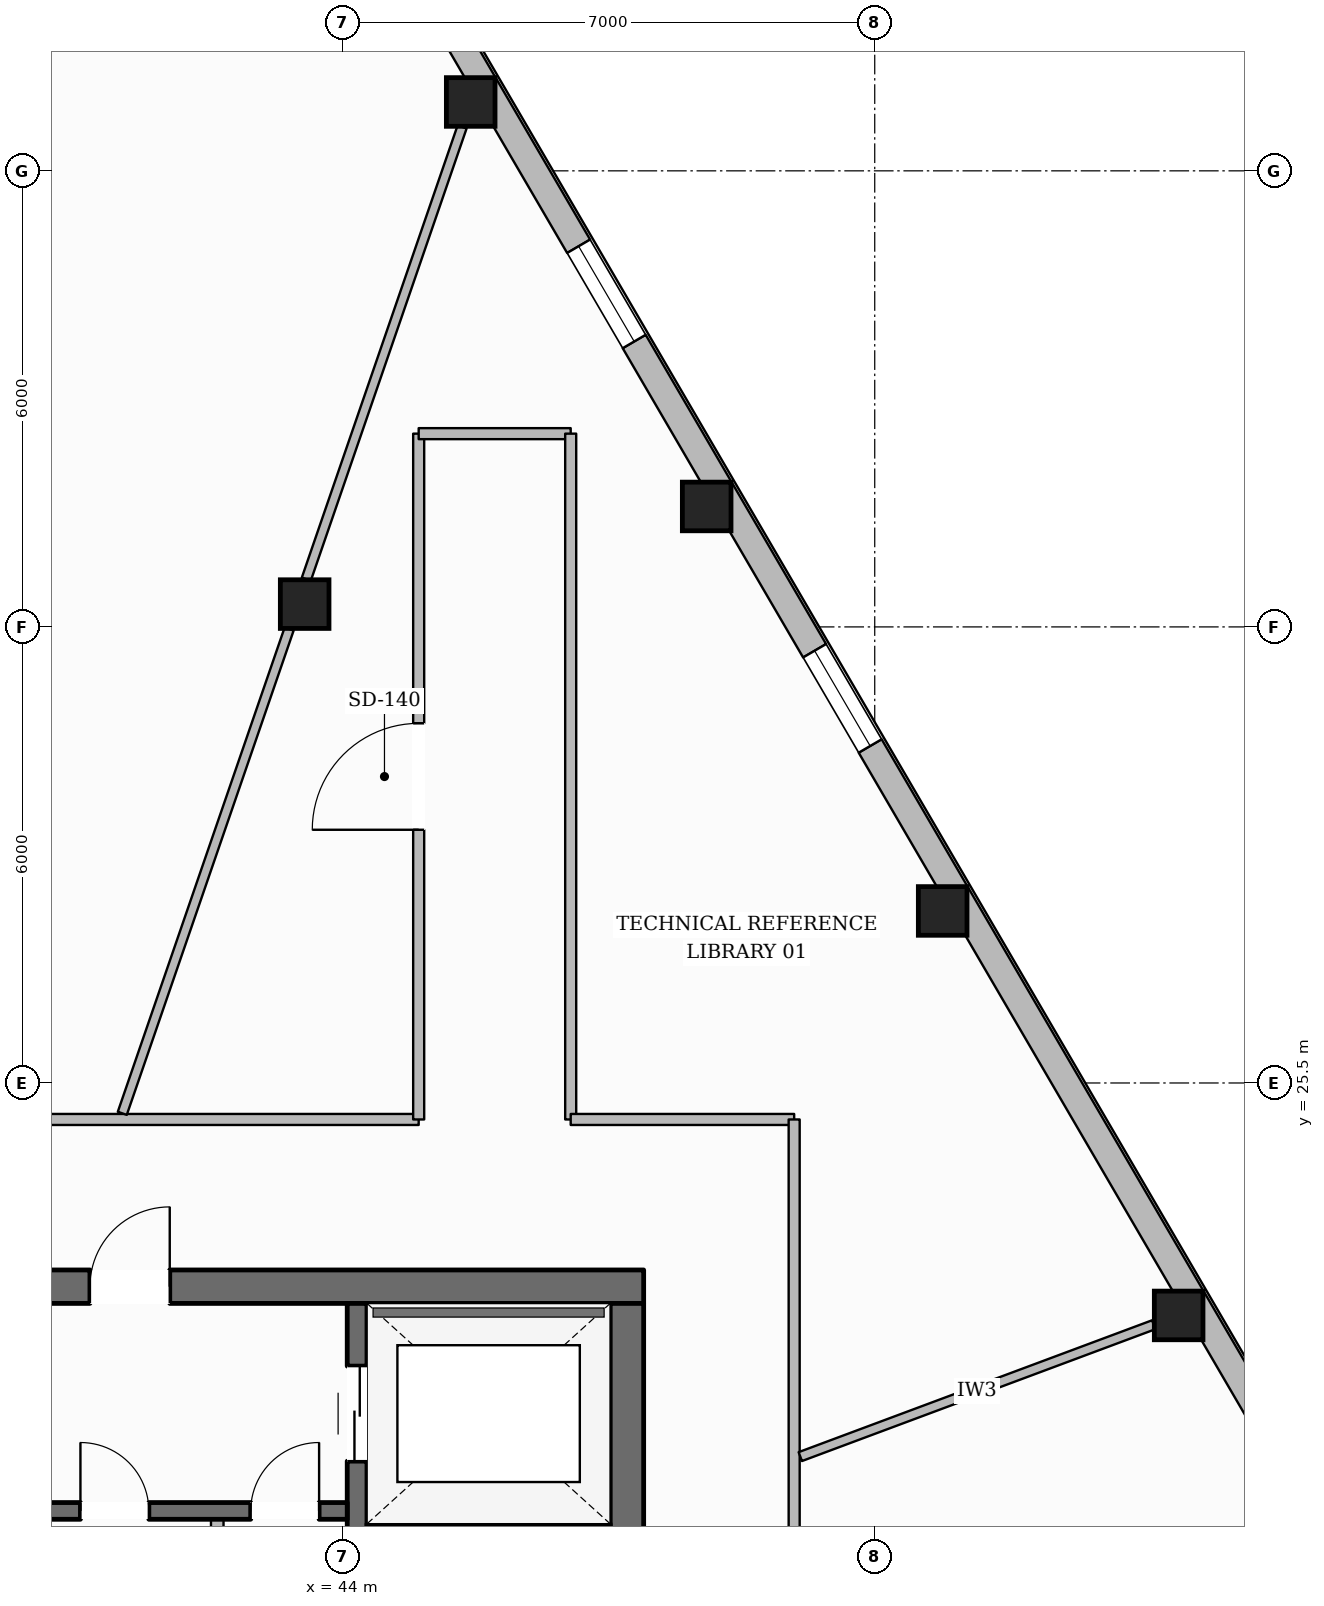
"""IFC4 building model, lengths in metres.
Left out: names, types, materials, properties, quantities, classifications, styles, units other than length and angle.
Written with IfcOpenShell. Run it as: python <this file> out.ifc"""

import sys

from ifc_helpers import new_model, si_unit, direction, frame, frame_2d, origin, origin_2d, place, context, subcontext, project, spatial, rectangle, hollow_rectangle, extrude, element, fill, save


model = new_model("IFC4")
c1 = context("Model", 3, precision=1e-05, world=origin(), true_north=direction((0.0, 1.0)))
c2 = subcontext(c1, "Body", "Model", "MODEL_VIEW")
j1 = project(units=[si_unit("LENGTHUNIT", "METRE"), si_unit("PLANEANGLEUNIT", "RADIAN")], contexts=[c1])
p1 = place(None, origin())
s1 = spatial("IfcSite", under=j1, at=p1, CompositionType="ELEMENT")
p2 = place(p1, origin())
s2 = spatial("IfcBuilding", under=s1, at=p2, CompositionType="ELEMENT")
p3 = place(p2, frame((0.0, 0.0, 180.4)))
s3 = spatial("IfcBuildingStorey", under=s2, at=p3, CompositionType="ELEMENT", Elevation=180.4)
p4 = place(p3, frame((28.04, 22.82, 0.0), z_axis=(0.0, 0.0, 1.0), x_axis=(1.0, 0.0, 0.0)))
e1 = element("IfcWall", 1, at=p4, inside=s3, PredefinedType="SOLIDWALL", context=c2, shape_type="SweptSolid", body=[
    extrude(rectangle(XDim=19.92, YDim=0.44, at=frame_2d((9.96, 0.0))), origin(), (0.0, 0.0, 1.0), 3.6),
])
p5 = place(p4, frame((6.235, 0.0, 0.0)))
e2 = element("IfcOpeningElement", 2, at=p5, cuts=e1, PredefinedType="OPENING", context=c2, shape_type="SweptSolid", body=[
    extrude(rectangle(XDim=1.05, YDim=2.15, at=frame_2d((0.525, 1.075))), frame((0.0, 0.23, 0.0), z_axis=(0.0, -1.0, 0.0), x_axis=(1.0, 0.0, 0.0)), (0.0, 0.0, 1.0), 0.46),
])
p6 = place(p4, frame((12.635, 0.0, 0.0)))
e3 = element("IfcOpeningElement", 3, at=p6, cuts=e1, PredefinedType="OPENING", context=c2, shape_type="SweptSolid", body=[
    extrude(rectangle(XDim=1.05, YDim=2.15, at=frame_2d((0.525, 1.075))), frame((0.0, 0.23, 0.0), z_axis=(0.0, -1.0, 0.0), x_axis=(1.0, 0.0, 0.0)), (0.0, 0.0, 1.0), 0.46),
])
p7 = place(p3, frame((47.74, 9.6, 0.0), z_axis=(0.0, 0.0, 1.0), x_axis=(0.0, 1.0, 0.0)))
e4 = element("IfcWall", 4, at=p7, inside=s3, PredefinedType="SOLIDWALL", context=c2, shape_type="SweptSolid", body=[
    extrude(rectangle(XDim=13.0, YDim=0.44, at=frame_2d((6.5, 0.0))), origin(), (0.0, 0.0, 1.0), 3.6),
])
p8 = place(p7, frame((0.2, 0.0, 0.0)))
e5 = element("IfcOpeningElement", 5, at=p8, cuts=e4, PredefinedType="OPENING", context=c2, shape_type="SweptSolid", body=[
    extrude(rectangle(XDim=1.1, YDim=2.15, at=frame_2d((0.55, 1.075))), frame((0.0, 0.23, 0.0), z_axis=(0.0, -1.0, 0.0), x_axis=(1.0, 0.0, 0.0)), (0.0, 0.0, 1.0), 0.46),
])
p9 = place(p7, frame((8.4, 0.0, 0.0)))
e6 = element("IfcOpeningElement", 6, at=p9, cuts=e4, PredefinedType="OPENING", context=c2, shape_type="SweptSolid", body=[
    extrude(rectangle(XDim=0.9, YDim=2.1, at=frame_2d((0.45, 1.05))), frame((0.0, 0.23, 0.0), z_axis=(0.0, -1.0, 0.0), x_axis=(1.0, 0.0, 0.0)), (0.0, 0.0, 1.0), 0.46),
])
p10 = place(p3, frame((44.19, 9.6, 0.0), z_axis=(0.0, 0.0, 1.0), x_axis=(0.0, 1.0, 0.0)))
e7 = element("IfcWall", 7, at=p10, inside=s3, PredefinedType="SHEAR", context=c2, shape_type="SweptSolid", body=[
    extrude(rectangle(XDim=13.0, YDim=0.26, at=frame_2d((6.5, 0.0))), origin(), (0.0, 0.0, 1.0), 3.6),
])
p11 = place(p10, frame((10.925, 0.0, 0.0)))
e8 = element("IfcOpeningElement", 8, at=p11, cuts=e7, PredefinedType="OPENING", context=c2, shape_type="SweptSolid", body=[
    extrude(rectangle(XDim=1.25, YDim=2.25, at=frame_2d((0.625, 1.125))), frame((0.0, 0.14, 0.0), z_axis=(0.0, -1.0, 0.0), x_axis=(1.0, 0.0, 0.0)), (0.0, 0.0, 1.0), 0.28),
])
p12 = place(p3, frame((44.32, 19.57, 0.0), z_axis=(0.0, 0.0, 1.0), x_axis=(1.0, 0.0, 0.0)))
e9 = element("IfcWall", 9, at=p12, inside=s3, PredefinedType="SHEAR", context=c2, shape_type="SweptSolid", body=[
    extrude(rectangle(XDim=3.2, YDim=0.26, at=frame_2d((1.6, 0.0))), origin(), (0.0, 0.0, 1.0), 3.6),
])
p13 = place(p3, frame((31.94, 19.87, 0.0), z_axis=(0.0, 0.0, 1.0), x_axis=(1.0, 0.0, 0.0)))
e10 = element("IfcWall", 10, at=p13, inside=s3, PredefinedType="SOLIDWALL", context=c2, shape_type="SweptSolid", body=[
    extrude(rectangle(XDim=12.12, YDim=0.22, at=frame_2d((6.06, 0.0))), origin(), (0.0, 0.0, 1.0), 3.6),
])
p14 = place(p13, frame((6.3, 0.0, 0.0)))
e11 = element("IfcOpeningElement", 11, at=p14, cuts=e10, PredefinedType="OPENING", context=c2, shape_type="SweptSolid", body=[
    extrude(rectangle(XDim=1.1, YDim=2.15, at=frame_2d((0.55, 1.075))), frame((0.0, 0.12, 0.0), z_axis=(0.0, -1.0, 0.0), x_axis=(1.0, 0.0, 0.0)), (0.0, 0.0, 1.0), 0.24),
])
p15 = place(p13, frame((8.61, 0.0, 0.0)))
e12 = element("IfcOpeningElement", 12, at=p15, cuts=e10, PredefinedType="OPENING", context=c2, shape_type="SweptSolid", body=[
    extrude(rectangle(XDim=0.9, YDim=2.1, at=frame_2d((0.45, 1.05))), frame((0.0, 0.12, 0.0), z_axis=(0.0, -1.0, 0.0), x_axis=(1.0, 0.0, 0.0)), (0.0, 0.0, 1.0), 0.24),
])
p16 = place(p13, frame((10.85, 0.0, 0.0)))
e13 = element("IfcOpeningElement", 13, at=p16, cuts=e10, PredefinedType="OPENING", context=c2, shape_type="SweptSolid", body=[
    extrude(rectangle(XDim=0.9, YDim=2.1, at=frame_2d((0.45, 1.05))), frame((0.0, 0.12, 0.0), z_axis=(0.0, -1.0, 0.0), x_axis=(1.0, 0.0, 0.0)), (0.0, 0.0, 1.0), 0.24),
])
for number, where, z_axis, x_axis in (
    (14, (54.998, 22.442, 0.0), (0.0, 0.0, 1.0), (1.0, 0.0, 0.0)),
    (15, (51.894, 27.763, 0.0), (0.0, 0.0, 1.0), (1.0, 0.0, 0.0)),
    (16, (48.789, 33.085, 0.0), (0.0, 0.0, 1.0), (1.0, 0.0, 0.0)),
    (17, (45.684, 38.406, 0.0), (0.0, 0.0, 1.0), (1.0, 0.0, 0.0)),
    (18, (43.5, 31.8, 0.0), (0.0, 0.0, 1.0), (1.0, 0.0, 0.0)),
):
    element("IfcColumn", number, at=place(p3, frame(where, z_axis=z_axis, x_axis=x_axis)), inside=s3, PredefinedType="COLUMN", context=c2, shape_type="SweptSolid", body=[
        extrude(hollow_rectangle(XDim=0.64, YDim=0.64, WallThickness=0.028, at=origin_2d()), origin(), (0.0, 0.0, 1.0), 3.6),
    ])
p17 = place(p3, frame((42.575, 44.272, 0.0), z_axis=(0.0, 0.0, 1.0), x_axis=(0.503934681705, -0.863741764982, 0.0)))
e19 = element("IfcWall", 19, at=p17, inside=s3, PredefinedType="STANDARD", context=c2, shape_type="SweptSolid", body=[
    extrude(rectangle(XDim=37.915, YDim=0.35, at=frame_2d((18.958, 0.0))), origin(), (0.0, 0.0, 1.0), 3.132),
])
p18 = place(p17, frame((33.633, 0.0, 0.65)))
e20 = element("IfcOpeningElement", 20, at=p18, cuts=e19, PredefinedType="OPENING", context=c2, shape_type="SweptSolid", body=[
    extrude(rectangle(XDim=1.45, YDim=1.75, at=frame_2d((0.725, 0.875))), frame((0.0, 0.185, 0.0), z_axis=(0.0, -1.0, 0.0), x_axis=(1.0, 0.0, 0.0)), (0.0, 0.0, 1.0), 0.37),
])
p19 = place(p17, frame((27.472, 0.0, 0.65)))
e21 = element("IfcOpeningElement", 21, at=p19, cuts=e19, PredefinedType="OPENING", context=c2, shape_type="SweptSolid", body=[
    extrude(rectangle(XDim=1.45, YDim=1.75, at=frame_2d((0.725, 0.875))), frame((0.0, 0.185, 0.0), z_axis=(0.0, -1.0, 0.0), x_axis=(1.0, 0.0, 0.0)), (0.0, 0.0, 1.0), 0.37),
])
p20 = place(p17, frame((15.15, 0.0, 0.65)))
e22 = element("IfcOpeningElement", 22, at=p20, cuts=e19, PredefinedType="OPENING", context=c2, shape_type="SweptSolid", body=[
    extrude(rectangle(XDim=1.45, YDim=1.75, at=frame_2d((0.725, 0.875))), frame((0.0, 0.185, 0.0), z_axis=(0.0, -1.0, 0.0), x_axis=(1.0, 0.0, 0.0)), (0.0, 0.0, 1.0), 0.37),
])
p21 = place(p17, frame((8.989, 0.0, 0.65)))
e23 = element("IfcOpeningElement", 23, at=p21, cuts=e19, PredefinedType="OPENING", context=c2, shape_type="SweptSolid", body=[
    extrude(rectangle(XDim=1.45, YDim=1.75, at=frame_2d((0.725, 0.875))), frame((0.0, 0.185, 0.0), z_axis=(0.0, -1.0, 0.0), x_axis=(1.0, 0.0, 0.0)), (0.0, 0.0, 1.0), 0.37),
])
p22 = place(p17, frame((2.828, 0.0, 0.65)))
e24 = element("IfcOpeningElement", 24, at=p22, cuts=e19, PredefinedType="OPENING", context=c2, shape_type="SweptSolid", body=[
    extrude(rectangle(XDim=1.45, YDim=1.75, at=frame_2d((0.725, 0.875))), frame((0.0, 0.185, 0.0), z_axis=(0.0, -1.0, 0.0), x_axis=(1.0, 0.0, 0.0)), (0.0, 0.0, 1.0), 0.37),
])
p23 = place(p3, frame((42.35, 16.56, 0.0), z_axis=(0.0, 0.0, 1.0), x_axis=(0.0, 1.0, 0.0)))
e25 = element("IfcWall", 25, at=p23, inside=s3, PredefinedType="PARTITIONING", context=c2, shape_type="SweptSolid", body=[
    extrude(rectangle(XDim=3.2, YDim=0.165, at=frame_2d((1.6, 0.0))), origin(), (0.0, 0.0, 1.0), 3.6),
])
p24 = place(p3, frame((31.0, 25.02, 0.0), z_axis=(0.0, 0.0, 1.0), x_axis=(1.0, 0.0, 0.0)))
e26 = element("IfcWall", 26, at=p24, inside=s3, PredefinedType="PARTITIONING", context=c2, shape_type="SweptSolid", body=[
    extrude(rectangle(XDim=14.0, YDim=0.145, at=frame_2d((7.0, 0.0))), origin(), (0.0, 0.0, 1.0), 3.6),
])
p25 = place(p24, frame((4.434, 0.0, 0.0)))
e27 = element("IfcOpeningElement", 27, at=p25, cuts=e26, PredefinedType="OPENING", context=c2, shape_type="SweptSolid", body=[
    extrude(rectangle(XDim=1.4, YDim=2.2, at=frame_2d((0.7, 1.1))), frame((0.0, 0.083, 0.0), z_axis=(0.0, -1.0, 0.0), x_axis=(1.0, 0.0, 0.0)), (0.0, 0.0, 1.0), 0.165),
])
p26 = place(p3, frame((45.0, 25.02, 0.0), z_axis=(0.0, 0.0, 1.0), x_axis=(0.0, 1.0, 0.0)))
e28 = element("IfcWall", 28, at=p26, inside=s3, PredefinedType="PARTITIONING", context=c2, shape_type="SweptSolid", body=[
    extrude(rectangle(XDim=9.022, YDim=0.145, at=frame_2d((4.511, 0.0))), origin(), (0.0, 0.0, 1.0), 3.6),
])
p27 = place(p26, frame((3.811, 0.0, 0.0)))
e29 = element("IfcOpeningElement", 29, at=p27, cuts=e28, PredefinedType="OPENING", context=c2, shape_type="SweptSolid", body=[
    extrude(rectangle(XDim=1.4, YDim=2.2, at=frame_2d((0.7, 1.1))), frame((0.0, 0.083, 0.0), z_axis=(0.0, -1.0, 0.0), x_axis=(1.0, 0.0, 0.0)), (0.0, 0.0, 1.0), 0.165),
])
p28 = place(p3, frame((45.0, 34.042, 0.0), z_axis=(0.0, 0.0, 1.0), x_axis=(1.0, 0.0, 0.0)))
e30 = element("IfcWall", 30, at=p28, inside=s3, PredefinedType="PARTITIONING", context=c2, shape_type="SweptSolid", body=[
    extrude(rectangle(XDim=2.0, YDim=0.145, at=frame_2d((1.0, 0.0))), origin(), (0.0, 0.0, 1.0), 3.6),
])
p29 = place(p3, frame((47.0, 34.042, 0.0), z_axis=(0.0, 0.0, 1.0), x_axis=(0.0, -1.0, 0.0)))
e31 = element("IfcWall", 31, at=p29, inside=s3, PredefinedType="PARTITIONING", context=c2, shape_type="SweptSolid", body=[
    extrude(rectangle(XDim=9.022, YDim=0.145, at=frame_2d((4.511, 0.0))), origin(), (0.0, 0.0, 1.0), 3.6),
])
p30 = place(p3, frame((47.0, 25.02, 0.0), z_axis=(0.0, 0.0, 1.0), x_axis=(1.0, 0.0, 0.0)))
e32 = element("IfcWall", 32, at=p30, inside=s3, PredefinedType="PARTITIONING", context=c2, shape_type="SweptSolid", body=[
    extrude(rectangle(XDim=2.94, YDim=0.145, at=frame_2d((1.47, 0.0))), origin(), (0.0, 0.0, 1.0), 3.6),
])
p31 = place(p3, frame((49.94, 25.02, 0.0), z_axis=(0.0, 0.0, 1.0), x_axis=(0.0, -1.0, 0.0)))
e33 = element("IfcWall", 33, at=p31, inside=s3, PredefinedType="PARTITIONING", context=c2, shape_type="SweptSolid", body=[
    extrude(rectangle(XDim=7.92, YDim=0.145, at=frame_2d((3.96, 0.0))), origin(), (0.0, 0.0, 1.0), 3.339),
])
p32 = place(p3, frame((50.021, 20.585, 0.0), z_axis=(0.0, 0.0, 1.0), x_axis=(0.936930245376, 0.349516402047, 0.0)))
e34 = element("IfcWall", 34, at=p32, inside=s3, PredefinedType="PARTITIONING", context=c2, shape_type="SweptSolid", body=[
    extrude(rectangle(XDim=4.963, YDim=0.125, at=frame_2d((2.481, 0.0))), origin(), (0.0, 0.0, 1.0), 3.6),
])
p33 = place(p3, frame((41.101, 25.101, 0.0), z_axis=(0.0, 0.0, 1.0), x_axis=(0.325732757855, 0.945461882077, 0.0)))
e35 = element("IfcWall", 35, at=p33, inside=s3, PredefinedType="PARTITIONING", context=c2, shape_type="SweptSolid", body=[
    extrude(rectangle(XDim=6.739, YDim=0.125, at=frame_2d((3.369, 0.0))), origin(), (0.0, 0.0, 1.0), 3.141),
])
p34 = place(p3, frame((43.521, 32.128, 0.0), z_axis=(0.0, 0.0, 1.0), x_axis=(0.325720467461, 0.945466116303, 0.0)))
e36 = element("IfcWall", 36, at=p34, inside=s3, PredefinedType="PARTITIONING", context=c2, shape_type="SweptSolid", body=[
    extrude(rectangle(XDim=6.293, YDim=0.125, at=frame_2d((3.146, 0.0))), origin(), (0.0, 0.0, 1.0), 3.6),
])
p35 = place(p20, origin())
e37 = element("IfcWindow", 37, at=p35, inside=s3, PartitioningType="SINGLE_PANEL", PredefinedType="WINDOW", context=c2, shape_type="SweptSolid", body=[
    extrude(rectangle(XDim=1.45, YDim=1.75, at=frame_2d((0.725, 0.875))), frame((0.0, 0.03, 0.0), z_axis=(0.0, -1.0, 0.0), x_axis=(1.0, 0.0, 0.0)), (0.0, 0.0, 1.0), 0.06),
])
fill(e22, e37)
p36 = place(p21, origin())
e38 = element("IfcWindow", 38, at=p36, inside=s3, PartitioningType="SINGLE_PANEL", PredefinedType="WINDOW", context=c2, shape_type="SweptSolid", body=[
    extrude(rectangle(XDim=1.45, YDim=1.75, at=frame_2d((0.725, 0.875))), frame((0.0, 0.03, 0.0), z_axis=(0.0, -1.0, 0.0), x_axis=(1.0, 0.0, 0.0)), (0.0, 0.0, 1.0), 0.06),
])
fill(e23, e38)
p37 = place(p6, origin())
e39 = element("IfcDoor", 39, at=p37, inside=s3, OperationType="SINGLE_SWING_RIGHT", PredefinedType="DOOR", context=c2, shape_type="SweptSolid", body=[
    extrude(rectangle(XDim=1.05, YDim=2.15, at=frame_2d((0.525, 1.075))), frame((0.0, 0.025, 0.0), z_axis=(0.0, -1.0, 0.0), x_axis=(1.0, 0.0, 0.0)), (0.0, 0.0, 1.0), 0.05),
])
fill(e3, e39)
p38 = place(p11, origin())
e40 = element("IfcDoor", 40, at=p38, inside=s3, OperationType="DOUBLE_DOOR_SLIDING", PredefinedType="DOOR", context=c2, shape_type="SweptSolid", body=[
    extrude(rectangle(XDim=1.25, YDim=2.25, at=frame_2d((0.625, 1.125))), frame((0.0, 0.025, 0.0), z_axis=(0.0, -1.0, 0.0), x_axis=(1.0, 0.0, 0.0)), (0.0, 0.0, 1.0), 0.05),
])
fill(e8, e40)
p39 = place(p15, origin())
e41 = element("IfcDoor", 41, at=p39, inside=s3, OperationType="SINGLE_SWING_LEFT", PredefinedType="DOOR", context=c2, shape_type="SweptSolid", body=[
    extrude(rectangle(XDim=0.9, YDim=2.1, at=frame_2d((0.45, 1.05))), frame((0.0, 0.025, 0.0), z_axis=(0.0, -1.0, 0.0), x_axis=(1.0, 0.0, 0.0)), (0.0, 0.0, 1.0), 0.05),
])
fill(e12, e41)
p40 = place(p16, origin())
e42 = element("IfcDoor", 42, at=p40, inside=s3, OperationType="SINGLE_SWING_RIGHT", PredefinedType="DOOR", context=c2, shape_type="SweptSolid", body=[
    extrude(rectangle(XDim=0.9, YDim=2.1, at=frame_2d((0.45, 1.05))), frame((0.0, 0.025, 0.0), z_axis=(0.0, -1.0, 0.0), x_axis=(1.0, 0.0, 0.0)), (0.0, 0.0, 1.0), 0.05),
])
fill(e13, e42)
p41 = place(p27, origin())
e43 = element("IfcDoor", 43, at=p41, inside=s3, OperationType="SINGLE_SWING_LEFT", PredefinedType="DOOR", context=c2, shape_type="SweptSolid", body=[
    extrude(rectangle(XDim=1.4, YDim=2.2, at=frame_2d((0.7, 1.1))), frame((0.0, 0.025, 0.0), z_axis=(0.0, -1.0, 0.0), x_axis=(1.0, 0.0, 0.0)), (0.0, 0.0, 1.0), 0.05),
])
fill(e29, e43)
save(model, sys.argv[1])
